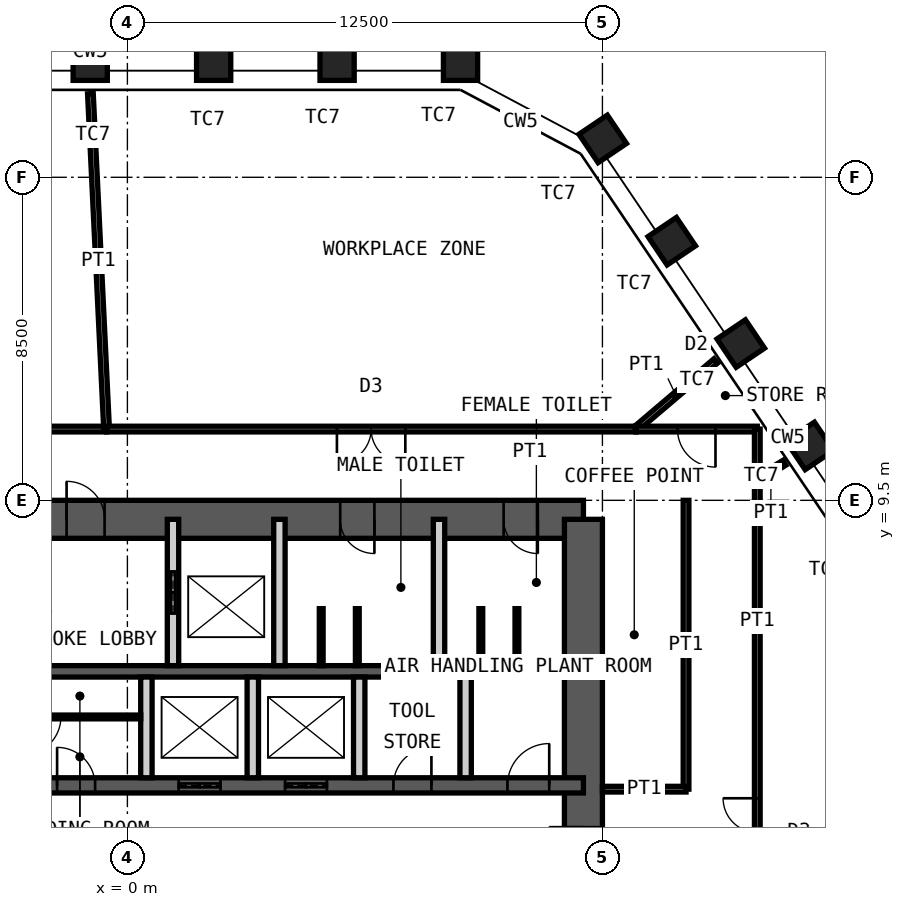
"""IFC4 building model, lengths in metres.
Left out: names, types, materials, properties, quantities, classifications, styles, units other than length and angle.
Written with IfcOpenShell. Run it as: python <this file> out.ifc"""

import sys

from ifc_helpers import new_model, si_unit, direction, frame, frame_2d, origin, origin_2d, place, context, subcontext, project, spatial, rectangle, hollow_rectangle, extrude, element, fill, save


model = new_model("IFC4")
c1 = context("Model", 3, precision=1e-05, world=origin(), true_north=direction((0.0, 1.0)))
c2 = subcontext(c1, "Body", "Model", "MODEL_VIEW")
j1 = project(units=[si_unit("LENGTHUNIT", "METRE"), si_unit("PLANEANGLEUNIT", "RADIAN")], contexts=[c1])
p1 = place(None, origin())
s1 = spatial("IfcSite", under=j1, at=p1, CompositionType="ELEMENT")
p2 = place(p1, origin())
s2 = spatial("IfcBuilding", under=s1, at=p2, CompositionType="ELEMENT")
p3 = place(p2, frame((0.0, 0.0, 295.6)))
s3 = spatial("IfcBuildingStorey", under=s2, at=p3, CompositionType="ELEMENT", Elevation=295.6)
for number, where, z_axis, x_axis in (
    (1, (-0.978, 21.0, 0.0), (0.0, 0.0, 1.0), (-1.0, 0.0, 0.0)),
    (2, (2.27, 21.0, 0.0), (0.0, 0.0, 1.0), (-1.0, 0.0, 0.0)),
    (3, (5.518, 21.0, 0.0), (0.0, 0.0, 1.0), (-1.0, 0.0, 0.0)),
    (4, (8.766, 21.0, 0.0), (0.0, 0.0, 1.0), (-1.0, 0.0, 0.0)),
    (5, (12.508, 19.01, 0.0), (0.0, 0.0, 1.0), (-0.559, 0.829, 0.0)),
    (6, (14.324, 16.318, 0.0), (0.0, 0.0, 1.0), (-0.559, 0.829, 0.0)),
    (7, (16.141, 13.625, 0.0), (0.0, 0.0, 1.0), (-0.559, 0.829, 0.0)),
    (8, (17.957, 10.932, 0.0), (0.0, 0.0, 1.0), (-0.559, 0.829, 0.0)),
):
    element("IfcColumn", number, at=place(p3, frame(where, z_axis=z_axis, x_axis=x_axis)), inside=s3, PredefinedType="COLUMN", context=c2, shape_type="SweptSolid", body=[
        extrude(hollow_rectangle(XDim=0.9, YDim=0.9, WallThickness=0.06, at=origin_2d()), origin(), (0.0, 0.0, 1.0), 4.2),
    ])
p4 = place(p3, frame((-12.0, 9.0, 0.0), z_axis=(0.0, 0.0, 1.0), x_axis=(1.0, 0.0, 0.0)))
e9 = element("IfcWall", 9, at=p4, inside=s3, PredefinedType="SHEAR", context=c2, shape_type="SweptSolid", body=[
    extrude(rectangle(XDim=24.0, YDim=1.0, at=frame_2d((12.0, 0.0))), origin(), (0.0, 0.0, 1.0), 4.2),
])
p5 = place(p4, frame((10.4, 0.0, 0.0)))
e10 = element("IfcOpeningElement", 10, at=p5, cuts=e9, PredefinedType="OPENING", context=c2, shape_type="SweptSolid", body=[
    extrude(rectangle(XDim=1.0, YDim=2.1, at=frame_2d((0.5, 1.05))), frame((0.0, 0.51, 0.0), z_axis=(0.0, -1.0, 0.0), x_axis=(1.0, 0.0, 0.0)), (0.0, 0.0, 1.0), 1.02),
])
p6 = place(p4, frame((17.6, 0.0, 0.0)))
e11 = element("IfcOpeningElement", 11, at=p6, cuts=e9, PredefinedType="OPENING", context=c2, shape_type="SweptSolid", body=[
    extrude(rectangle(XDim=0.9, YDim=2.1, at=frame_2d((0.45, 1.05))), frame((0.0, 0.51, 0.0), z_axis=(0.0, -1.0, 0.0), x_axis=(1.0, 0.0, 0.0)), (0.0, 0.0, 1.0), 1.02),
])
p7 = place(p4, frame((21.9, 0.0, 0.0)))
e12 = element("IfcOpeningElement", 12, at=p7, cuts=e9, PredefinedType="OPENING", context=c2, shape_type="SweptSolid", body=[
    extrude(rectangle(XDim=0.9, YDim=2.1, at=frame_2d((0.45, 1.05))), frame((0.0, 0.51, 0.0), z_axis=(0.0, -1.0, 0.0), x_axis=(1.0, 0.0, 0.0)), (0.0, 0.0, 1.0), 1.02),
])
p8 = place(p3, frame((12.0, -9.0, 0.0), z_axis=(0.0, 0.0, 1.0), x_axis=(0.0, 1.0, 0.0)))
e13 = element("IfcWall", 13, at=p8, inside=s3, PredefinedType="SHEAR", context=c2, shape_type="SweptSolid", body=[
    extrude(rectangle(XDim=18.0, YDim=1.0, at=frame_2d((9.0, 0.0))), origin(), (0.0, 0.0, 1.0), 4.2),
])
p9 = place(p8, frame((8.1, 0.0, 0.0)))
e14 = element("IfcOpeningElement", 14, at=p9, cuts=e13, PredefinedType="OPENING", context=c2, shape_type="SweptSolid", body=[
    extrude(rectangle(XDim=1.8, YDim=2.1, at=frame_2d((0.9, 1.05))), frame((0.0, 0.51, 0.0), z_axis=(0.0, -1.0, 0.0), x_axis=(1.0, 0.0, 0.0)), (0.0, 0.0, 1.0), 1.02),
])
p10 = place(p3, frame((-12.0, 5.0, 0.0), z_axis=(0.0, 0.0, 1.0), x_axis=(1.0, 0.0, 0.0)))
e15 = element("IfcWall", 15, at=p10, inside=s3, PredefinedType="SHEAR", context=c2, shape_type="SweptSolid", body=[
    extrude(rectangle(XDim=24.0, YDim=0.3, at=frame_2d((12.0, 0.0))), origin(), (0.0, 0.0, 1.0), 4.2),
])
p11 = place(p3, frame((-12.0, 2.0, 0.0), z_axis=(0.0, 0.0, 1.0), x_axis=(1.0, 0.0, 0.0)))
e16 = element("IfcWall", 16, at=p11, inside=s3, PredefinedType="SHEAR", context=c2, shape_type="SweptSolid", body=[
    extrude(rectangle(XDim=24.0, YDim=0.4, at=frame_2d((12.0, 0.0))), origin(), (0.0, 0.0, 1.0), 4.2),
])
p12 = place(p11, frame((2.4, 0.0, 0.0)))
e17 = element("IfcOpeningElement", 17, at=p12, cuts=e16, PredefinedType="OPENING", context=c2, shape_type="SweptSolid", body=[
    extrude(rectangle(XDim=1.1, YDim=2.1, at=frame_2d((0.55, 1.05))), frame((0.0, 0.21, 0.0), z_axis=(0.0, -1.0, 0.0), x_axis=(1.0, 0.0, 0.0)), (0.0, 0.0, 1.0), 0.42),
])
p13 = place(p11, frame((22.0, 0.0, 0.0)))
e18 = element("IfcOpeningElement", 18, at=p13, cuts=e16, PredefinedType="OPENING", context=c2, shape_type="SweptSolid", body=[
    extrude(rectangle(XDim=1.1, YDim=2.1, at=frame_2d((0.55, 1.05))), frame((0.0, 0.21, 0.0), z_axis=(0.0, -1.0, 0.0), x_axis=(1.0, 0.0, 0.0)), (0.0, 0.0, 1.0), 0.42),
])
p14 = place(p11, frame((10.15, 0.0, 0.0)))
e19 = element("IfcOpeningElement", 19, at=p14, cuts=e16, PredefinedType="OPENING", context=c2, shape_type="SweptSolid", body=[
    extrude(rectangle(XDim=1.0, YDim=2.1, at=frame_2d((0.5, 1.05))), frame((0.0, 0.21, 0.0), z_axis=(0.0, -1.0, 0.0), x_axis=(1.0, 0.0, 0.0)), (0.0, 0.0, 1.0), 0.42),
])
p15 = place(p11, frame((6.9, 0.0, 0.0)))
e20 = element("IfcOpeningElement", 20, at=p15, cuts=e16, PredefinedType="OPENING", context=c2, shape_type="SweptSolid", body=[
    extrude(rectangle(XDim=1.0, YDim=2.1, at=frame_2d((0.5, 1.05))), frame((0.0, 0.21, 0.0), z_axis=(0.0, -1.0, 0.0), x_axis=(1.0, 0.0, 0.0)), (0.0, 0.0, 1.0), 0.42),
])
p16 = place(p11, frame((13.35, 0.0, 0.0)))
e21 = element("IfcOpeningElement", 21, at=p16, cuts=e16, PredefinedType="OPENING", context=c2, shape_type="SweptSolid", body=[
    extrude(rectangle(XDim=1.1, YDim=2.4, at=frame_2d((0.55, 1.2))), frame((0.0, 0.21, 0.0), z_axis=(0.0, -1.0, 0.0), x_axis=(1.0, 0.0, 0.0)), (0.0, 0.0, 1.0), 0.42),
])
p17 = place(p11, frame((16.15, 0.0, 0.0)))
e22 = element("IfcOpeningElement", 22, at=p17, cuts=e16, PredefinedType="OPENING", context=c2, shape_type="SweptSolid", body=[
    extrude(rectangle(XDim=1.1, YDim=2.4, at=frame_2d((0.55, 1.2))), frame((0.0, 0.21, 0.0), z_axis=(0.0, -1.0, 0.0), x_axis=(1.0, 0.0, 0.0)), (0.0, 0.0, 1.0), 0.42),
])
p18 = place(p11, frame((19.0, 0.0, 0.0)))
e23 = element("IfcOpeningElement", 23, at=p18, cuts=e16, PredefinedType="OPENING", context=c2, shape_type="SweptSolid", body=[
    extrude(rectangle(XDim=1.0, YDim=2.1, at=frame_2d((0.5, 1.05))), frame((0.0, 0.21, 0.0), z_axis=(0.0, -1.0, 0.0), x_axis=(1.0, 0.0, 0.0)), (0.0, 0.0, 1.0), 0.42),
])
p19 = place(p3, frame((1.2, 5.15, 0.0), z_axis=(0.0, 0.0, 1.0), x_axis=(0.0, 1.0, 0.0)))
e24 = element("IfcWall", 24, at=p19, inside=s3, PredefinedType="PARTITIONING", context=c2, shape_type="SweptSolid", body=[
    extrude(rectangle(XDim=3.85, YDim=0.3, at=frame_2d((1.925, 0.0))), origin(), (0.0, 0.0, 1.0), 3.98),
])
p20 = place(p19, frame((1.375, 0.0, 0.0)))
e25 = element("IfcOpeningElement", 25, at=p20, cuts=e24, PredefinedType="OPENING", context=c2, shape_type="SweptSolid", body=[
    extrude(rectangle(XDim=1.1, YDim=2.4, at=frame_2d((0.55, 1.2))), frame((0.0, 0.16, 0.0), z_axis=(0.0, -1.0, 0.0), x_axis=(1.0, 0.0, 0.0)), (0.0, 0.0, 1.0), 0.32),
])
for number, where, z_axis, x_axis in (
    (26, (4.0, 5.15, 0.0), (0.0, 0.0, 1.0), (0.0, 1.0, 0.0)),
    (27, (8.2, 5.15, 0.0), (0.0, 0.0, 1.0), (0.0, 1.0, 0.0)),
):
    element("IfcWall", number, at=place(p3, frame(where, z_axis=z_axis, x_axis=x_axis)), inside=s3, PredefinedType="PARTITIONING", context=c2, shape_type="SweptSolid", body=[
        extrude(rectangle(XDim=3.85, YDim=0.3, at=frame_2d((1.925, 0.0))), origin(), (0.0, 0.0, 1.0), 3.98),
    ])
for number, where, z_axis, x_axis in (
    (28, (0.5, 2.2, 0.0), (0.0, 0.0, 1.0), (0.0, 1.0, 0.0)),
    (29, (3.3, 2.2, 0.0), (0.0, 0.0, 1.0), (0.0, 1.0, 0.0)),
    (30, (6.1, 2.2, 0.0), (0.0, 0.0, 1.0), (0.0, 1.0, 0.0)),
    (31, (8.9, 2.2, 0.0), (0.0, 0.0, 1.0), (0.0, 1.0, 0.0)),
):
    element("IfcWall", number, at=place(p3, frame(where, z_axis=z_axis, x_axis=x_axis)), inside=s3, PredefinedType="PARTITIONING", context=c2, shape_type="SweptSolid", body=[
        extrude(rectangle(XDim=2.65, YDim=0.3, at=frame_2d((1.325, 0.0))), origin(), (0.0, 0.0, 1.0), 3.98),
    ])
p21 = place(p3, frame((-2.85, 3.8, 0.0), z_axis=(0.0, 0.0, 1.0), x_axis=(1.0, 0.0, 0.0)))
e32 = element("IfcWall", 32, at=p21, inside=s3, PredefinedType="PARTITIONING", context=c2, shape_type="SweptSolid", body=[
    extrude(rectangle(XDim=3.2, YDim=0.1, at=frame_2d((1.6, 0.0))), origin(), (0.0, 0.0, 1.0), 3.98),
])
p22 = place(p21, frame((0.1, 0.0, 0.0)))
e33 = element("IfcOpeningElement", 33, at=p22, cuts=e32, PredefinedType="OPENING", context=c2, shape_type="SweptSolid", body=[
    extrude(rectangle(XDim=1.0, YDim=2.4, at=frame_2d((0.5, 1.2))), frame((0.0, 0.06, 0.0), z_axis=(0.0, -1.0, 0.0), x_axis=(1.0, 0.0, 0.0)), (0.0, 0.0, 1.0), 0.12),
])
for number, where, z_axis, x_axis in (
    (34, (5.1, 5.15, 0.0), (0.0, 0.0, 1.0), (0.0, 1.0, 0.0)),
    (35, (6.05, 5.15, 0.0), (0.0, 0.0, 1.0), (0.0, 1.0, 0.0)),
    (36, (9.3, 5.15, 0.0), (0.0, 0.0, 1.0), (0.0, 1.0, 0.0)),
    (37, (10.25, 5.15, 0.0), (0.0, 0.0, 1.0), (0.0, 1.0, 0.0)),
):
    element("IfcWall", number, at=place(p3, frame(where, z_axis=z_axis, x_axis=x_axis)), inside=s3, PredefinedType="PARTITIONING", context=c2, shape_type="SweptSolid", body=[
        extrude(rectangle(XDim=1.5, YDim=0.1, at=frame_2d((0.75, 0.0))), origin(), (0.0, 0.0, 1.0), 2.1),
    ])
p23 = place(p3, frame((-8.312, 11.375, 0.0), z_axis=(0.0, 0.0, 1.0), x_axis=(1.0, 0.0, 0.0)))
e38 = element("IfcWall", 38, at=p23, inside=s3, PredefinedType="PARTITIONING", context=c2, shape_type="SweptSolid", body=[
    extrude(rectangle(XDim=7.764, YDim=0.15, at=frame_2d((3.882, 0.0))), origin(), (0.0, 0.0, 1.0), 4.03),
])
p24 = place(p23, frame((2.982, 0.0, 0.0)))
e39 = element("IfcOpeningElement", 39, at=p24, cuts=e38, PredefinedType="OPENING", context=c2, shape_type="SweptSolid", body=[
    extrude(rectangle(XDim=1.8, YDim=2.4, at=frame_2d((0.9, 1.2))), frame((0.0, 0.085, 0.0), z_axis=(0.0, -1.0, 0.0), x_axis=(1.0, 0.0, 0.0)), (0.0, 0.0, 1.0), 0.17),
])
p25 = place(p3, frame((-0.973, 20.2, 0.0), z_axis=(0.0, 0.0, 1.0), x_axis=(0.048134910622, -0.998840843368, 0.0)))
e40 = element("IfcWall", 40, at=p25, inside=s3, PredefinedType="PARTITIONING", context=c2, shape_type="SweptSolid", body=[
    extrude(rectangle(XDim=8.835, YDim=0.15, at=frame_2d((4.418, 0.0))), origin(), (0.0, 0.0, 1.0), 2.93),
])
p26 = place(p3, frame((-0.548, 11.375, 0.0), z_axis=(0.0, 0.0, 1.0), x_axis=(1.0, 0.0, 0.0)))
e41 = element("IfcWall", 41, at=p26, inside=s3, PredefinedType="PARTITIONING", context=c2, shape_type="SweptSolid", body=[
    extrude(rectangle(XDim=13.923, YDim=0.15, at=frame_2d((6.961, 0.0))), origin(), (0.0, 0.0, 1.0), 4.03),
])
p27 = place(p26, frame((6.062, 0.0, 0.0)))
e42 = element("IfcOpeningElement", 42, at=p27, cuts=e41, PredefinedType="OPENING", context=c2, shape_type="SweptSolid", body=[
    extrude(rectangle(XDim=1.8, YDim=2.4, at=frame_2d((0.9, 1.2))), frame((0.0, 0.085, 0.0), z_axis=(0.0, -1.0, 0.0), x_axis=(1.0, 0.0, 0.0)), (0.0, 0.0, 1.0), 0.17),
])
p28 = place(p3, frame((15.484, 13.169, 0.0), z_axis=(0.0, 0.0, 1.0), x_axis=(-0.761734753955, -0.647889006403, 0.0)))
e43 = element("IfcWall", 43, at=p28, inside=s3, PredefinedType="PARTITIONING", context=c2, shape_type="SweptSolid", body=[
    extrude(rectangle(XDim=2.769, YDim=0.15, at=frame_2d((1.384, 0.0))), origin(), (0.0, 0.0, 1.0), 2.93),
])
p29 = place(p3, frame((13.375, 11.375, 0.0), z_axis=(0.0, 0.0, 1.0), x_axis=(1.0, 0.0, 0.0)))
e44 = element("IfcWall", 44, at=p29, inside=s3, PredefinedType="PARTITIONING", context=c2, shape_type="SweptSolid", body=[
    extrude(rectangle(XDim=3.2, YDim=0.15, at=frame_2d((1.6, 0.0))), origin(), (0.0, 0.0, 1.0), 4.03),
])
p30 = place(p29, frame((1.1, 0.0, 0.0)))
e45 = element("IfcOpeningElement", 45, at=p30, cuts=e44, PredefinedType="OPENING", context=c2, shape_type="SweptSolid", body=[
    extrude(rectangle(XDim=1.0, YDim=2.4, at=frame_2d((0.5, 1.2))), frame((0.0, 0.085, 0.0), z_axis=(0.0, -1.0, 0.0), x_axis=(1.0, 0.0, 0.0)), (0.0, 0.0, 1.0), 0.17),
])
p31 = place(p3, frame((16.575, 11.375, 0.0), z_axis=(0.0, 0.0, 1.0), x_axis=(0.0, -1.0, 0.0)))
e46 = element("IfcWall", 46, at=p31, inside=s3, PredefinedType="PARTITIONING", context=c2, shape_type="SweptSolid", body=[
    extrude(rectangle(XDim=1.321, YDim=0.15, at=frame_2d((0.66, 0.0))), origin(), (0.0, 0.0, 1.0), 4.03),
])
p32 = place(p3, frame((17.291, 10.489, 0.0), z_axis=(0.0, 0.0, 1.0), x_axis=(-0.855013745288, -0.518605336811, 0.0)))
e47 = element("IfcWall", 47, at=p32, inside=s3, PredefinedType="PARTITIONING", context=c2, shape_type="SweptSolid", body=[
    extrude(rectangle(XDim=0.837, YDim=0.15, at=frame_2d((0.419, 0.0))), origin(), (0.0, 0.0, 1.0), 2.93),
])
p33 = place(p3, frame((16.575, 10.054, 0.0), z_axis=(0.0, 0.0, 1.0), x_axis=(0.0, -1.0, 0.0)))
e48 = element("IfcWall", 48, at=p33, inside=s3, PredefinedType="PARTITIONING", context=c2, shape_type="SweptSolid", body=[
    extrude(rectangle(XDim=18.588, YDim=0.15, at=frame_2d((9.294, 0.0))), origin(), (0.0, 0.0, 1.0), 4.03),
])
p34 = place(p33, frame((8.394, 0.0, 0.0)))
e49 = element("IfcOpeningElement", 49, at=p34, cuts=e48, PredefinedType="OPENING", context=c2, shape_type="SweptSolid", body=[
    extrude(rectangle(XDim=1.8, YDim=2.4, at=frame_2d((0.9, 1.2))), frame((0.0, 0.085, 0.0), z_axis=(0.0, -1.0, 0.0), x_axis=(1.0, 0.0, 0.0)), (0.0, 0.0, 1.0), 0.17),
])
p35 = place(p3, frame((14.7, 1.9, 0.0), z_axis=(0.0, 0.0, 1.0), x_axis=(0.0, 1.0, 0.0)))
e50 = element("IfcWall", 50, at=p35, inside=s3, PredefinedType="PARTITIONING", context=c2, shape_type="SweptSolid", body=[
    extrude(rectangle(XDim=7.6, YDim=0.15, at=frame_2d((3.8, 0.0))), origin(), (0.0, 0.0, 1.0), 4.03),
])
p36 = place(p3, frame((12.5, 1.9, 0.0), z_axis=(0.0, 0.0, 1.0), x_axis=(1.0, 0.0, 0.0)))
e51 = element("IfcWall", 51, at=p36, inside=s3, PredefinedType="PARTITIONING", context=c2, shape_type="SweptSolid", body=[
    extrude(rectangle(XDim=2.2, YDim=0.15, at=frame_2d((1.1, 0.0))), origin(), (0.0, 0.0, 1.0), 3.03),
])
p37 = place(p5, origin())
e52 = element("IfcDoor", 52, at=p37, inside=s3, OperationType="SINGLE_SWING_RIGHT", PredefinedType="DOOR", context=c2, shape_type="SweptSolid", body=[
    extrude(rectangle(XDim=1.0, YDim=2.1, at=frame_2d((0.5, 1.05))), frame((0.0, 0.025, 0.0), z_axis=(0.0, -1.0, 0.0), x_axis=(1.0, 0.0, 0.0)), (0.0, 0.0, 1.0), 0.05),
])
fill(e10, e52)
p38 = place(p6, origin())
e53 = element("IfcDoor", 53, at=p38, inside=s3, OperationType="SINGLE_SWING_RIGHT", PredefinedType="DOOR", context=c2, shape_type="SweptSolid", body=[
    extrude(rectangle(XDim=0.9, YDim=2.1, at=frame_2d((0.45, 1.05))), frame((0.0, 0.025, 0.0), z_axis=(0.0, -1.0, 0.0), x_axis=(1.0, 0.0, 0.0)), (0.0, 0.0, 1.0), 0.05),
])
fill(e11, e53)
p39 = place(p7, origin())
e54 = element("IfcDoor", 54, at=p39, inside=s3, OperationType="SINGLE_SWING_RIGHT", PredefinedType="DOOR", context=c2, shape_type="SweptSolid", body=[
    extrude(rectangle(XDim=0.9, YDim=2.1, at=frame_2d((0.45, 1.05))), frame((0.0, 0.025, 0.0), z_axis=(0.0, -1.0, 0.0), x_axis=(1.0, 0.0, 0.0)), (0.0, 0.0, 1.0), 0.05),
])
fill(e12, e54)
p40 = place(p13, origin())
e55 = element("IfcDoor", 55, at=p40, inside=s3, OperationType="SINGLE_SWING_LEFT", PredefinedType="DOOR", context=c2, shape_type="SweptSolid", body=[
    extrude(rectangle(XDim=1.1, YDim=2.1, at=frame_2d((0.55, 1.05))), frame((0.0, 0.025, 0.0), z_axis=(0.0, -1.0, 0.0), x_axis=(1.0, 0.0, 0.0)), (0.0, 0.0, 1.0), 0.05),
])
fill(e18, e55)
p41 = place(p14, origin())
e56 = element("IfcDoor", 56, at=p41, inside=s3, OperationType="SINGLE_SWING_RIGHT", PredefinedType="DOOR", context=c2, shape_type="SweptSolid", body=[
    extrude(rectangle(XDim=1.0, YDim=2.1, at=frame_2d((0.5, 1.05))), frame((0.0, 0.025, 0.0), z_axis=(0.0, -1.0, 0.0), x_axis=(1.0, 0.0, 0.0)), (0.0, 0.0, 1.0), 0.05),
])
fill(e19, e56)
p42 = place(p9, origin())
e57 = element("IfcDoor", 57, at=p42, inside=s3, OperationType="DOUBLE_DOOR_DOUBLE_SWING", PredefinedType="DOOR", context=c2, shape_type="SweptSolid", body=[
    extrude(rectangle(XDim=1.8, YDim=2.1, at=frame_2d((0.9, 1.05))), frame((0.0, 0.025, 0.0), z_axis=(0.0, -1.0, 0.0), x_axis=(1.0, 0.0, 0.0)), (0.0, 0.0, 1.0), 0.05),
])
fill(e14, e57)
p43 = place(p20, origin())
e58 = element("IfcDoor", 58, at=p43, inside=s3, OperationType="DOUBLE_DOOR_SLIDING", PredefinedType="DOOR", context=c2, shape_type="SweptSolid", body=[
    extrude(rectangle(XDim=1.1, YDim=2.4, at=frame_2d((0.55, 1.2))), frame((0.0, 0.025, 0.0), z_axis=(0.0, -1.0, 0.0), x_axis=(1.0, 0.0, 0.0)), (0.0, 0.0, 1.0), 0.05),
])
fill(e25, e58)
p44 = place(p16, origin())
e59 = element("IfcDoor", 59, at=p44, inside=s3, OperationType="DOUBLE_DOOR_SLIDING", PredefinedType="DOOR", context=c2, shape_type="SweptSolid", body=[
    extrude(rectangle(XDim=1.1, YDim=2.4, at=frame_2d((0.55, 1.2))), frame((0.0, 0.025, 0.0), z_axis=(0.0, -1.0, 0.0), x_axis=(1.0, 0.0, 0.0)), (0.0, 0.0, 1.0), 0.05),
])
fill(e21, e59)
p45 = place(p17, origin())
e60 = element("IfcDoor", 60, at=p45, inside=s3, OperationType="DOUBLE_DOOR_SLIDING", PredefinedType="DOOR", context=c2, shape_type="SweptSolid", body=[
    extrude(rectangle(XDim=1.1, YDim=2.4, at=frame_2d((0.55, 1.2))), frame((0.0, 0.025, 0.0), z_axis=(0.0, -1.0, 0.0), x_axis=(1.0, 0.0, 0.0)), (0.0, 0.0, 1.0), 0.05),
])
fill(e22, e60)
p46 = place(p18, origin())
e61 = element("IfcDoor", 61, at=p46, inside=s3, OperationType="SINGLE_SWING_LEFT", PredefinedType="DOOR", context=c2, shape_type="SweptSolid", body=[
    extrude(rectangle(XDim=1.0, YDim=2.1, at=frame_2d((0.5, 1.05))), frame((0.0, 0.025, 0.0), z_axis=(0.0, -1.0, 0.0), x_axis=(1.0, 0.0, 0.0)), (0.0, 0.0, 1.0), 0.05),
])
fill(e23, e61)
p47 = place(p22, origin())
e62 = element("IfcDoor", 62, at=p47, inside=s3, OperationType="SINGLE_SWING_LEFT", PredefinedType="DOOR", context=c2, shape_type="SweptSolid", body=[
    extrude(rectangle(XDim=1.0, YDim=2.4, at=frame_2d((0.5, 1.2))), frame((0.0, 0.025, 0.0), z_axis=(0.0, -1.0, 0.0), x_axis=(1.0, 0.0, 0.0)), (0.0, 0.0, 1.0), 0.05),
])
fill(e33, e62)
p48 = place(p27, origin())
e63 = element("IfcDoor", 63, at=p48, inside=s3, OperationType="DOUBLE_DOOR_DOUBLE_SWING", PredefinedType="DOOR", context=c2, shape_type="SweptSolid", body=[
    extrude(rectangle(XDim=1.8, YDim=2.4, at=frame_2d((0.9, 1.2))), frame((0.0, 0.025, 0.0), z_axis=(0.0, -1.0, 0.0), x_axis=(1.0, 0.0, 0.0)), (0.0, 0.0, 1.0), 0.05),
])
fill(e42, e63)
p49 = place(p30, origin())
e64 = element("IfcDoor", 64, at=p49, inside=s3, OperationType="SINGLE_SWING_RIGHT", PredefinedType="DOOR", context=c2, shape_type="SweptSolid", body=[
    extrude(rectangle(XDim=1.0, YDim=2.4, at=frame_2d((0.5, 1.2))), frame((0.0, 0.025, 0.0), z_axis=(0.0, -1.0, 0.0), x_axis=(1.0, 0.0, 0.0)), (0.0, 0.0, 1.0), 0.05),
])
fill(e45, e64)
p50 = place(p34, origin())
e65 = element("IfcDoor", 65, at=p50, inside=s3, OperationType="DOUBLE_DOOR_DOUBLE_SWING", PredefinedType="DOOR", context=c2, shape_type="SweptSolid", body=[
    extrude(rectangle(XDim=1.8, YDim=2.4, at=frame_2d((0.9, 1.2))), frame((0.0, 0.025, 0.0), z_axis=(0.0, -1.0, 0.0), x_axis=(1.0, 0.0, 0.0)), (0.0, 0.0, 1.0), 0.05),
])
fill(e49, e65)
save(model, sys.argv[1])
